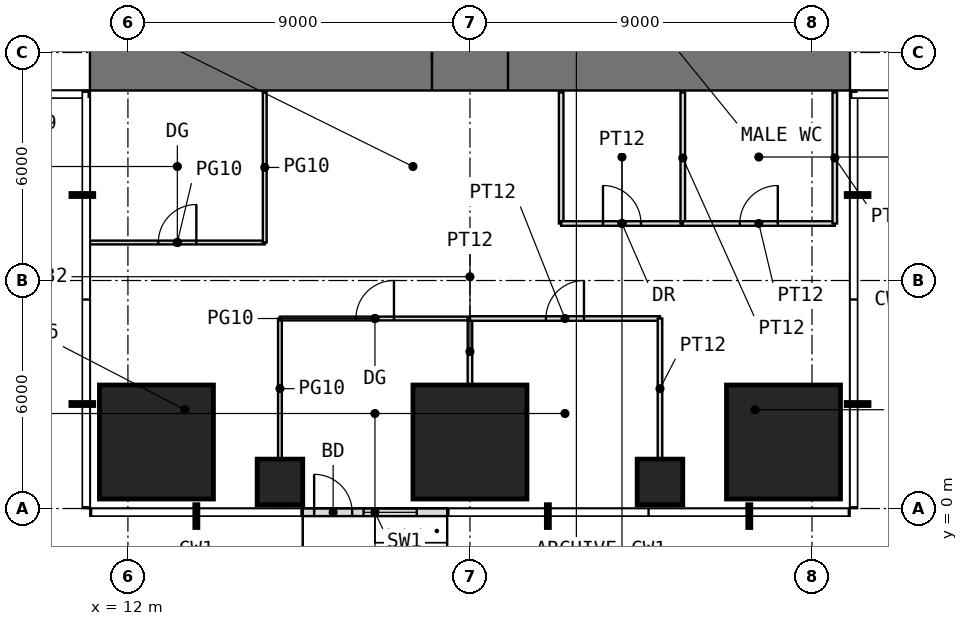
"""IFC4 building model, lengths in metres.
Left out: names, types, materials, properties, quantities, classifications, styles, units other than length and angle.
Written with IfcOpenShell. Run it as: python <this file> out.ifc"""

import sys

from ifc_helpers import new_model, si_unit, direction, frame, frame_2d, origin, origin_2d, place, context, subcontext, project, spatial, rectangle, extrude, element, fill, save


model = new_model("IFC4")
c1 = context("Model", 3, precision=1e-05, world=origin(), true_north=direction((0.0, 1.0)))
c2 = subcontext(c1, "Body", "Model", "MODEL_VIEW")
j1 = project(units=[si_unit("LENGTHUNIT", "METRE"), si_unit("PLANEANGLEUNIT", "RADIAN")], contexts=[c1])
p1 = place(None, origin())
s1 = spatial("IfcSite", under=j1, at=p1, CompositionType="ELEMENT")
p2 = place(p1, origin())
s2 = spatial("IfcBuilding", under=s1, at=p2, CompositionType="ELEMENT")
p3 = place(p2, frame((0.0, 0.0, 116.5)))
s3 = spatial("IfcBuildingStorey", under=s2, at=p3, CompositionType="ELEMENT", Elevation=116.5)
p4 = place(p3, frame((12.75, 1.75, 0.0), z_axis=(0.0, 0.0, 1.0), x_axis=(1.0, 0.0, 0.0)))
e1 = element("IfcColumn", 1, at=p4, inside=s3, PredefinedType="COLUMN", context=c2, shape_type="SweptSolid", body=[
    extrude(rectangle(XDim=3.0, YDim=3.0, at=origin_2d()), origin(), (0.0, 0.0, 1.0), 4.0),
])
p5 = place(p3, frame((16.0, 0.7, 0.0), z_axis=(0.0, 0.0, 1.0), x_axis=(1.0, 0.0, 0.0)))
e2 = element("IfcColumn", 2, at=p5, inside=s3, PredefinedType="COLUMN", context=c2, shape_type="SweptSolid", body=[
    extrude(rectangle(XDim=1.2, YDim=1.2, at=origin_2d()), origin(), (0.0, 0.0, 1.0), 4.0),
])
p6 = place(p3, frame((21.0, 1.75, 0.0), z_axis=(0.0, 0.0, 1.0), x_axis=(1.0, 0.0, 0.0)))
e3 = element("IfcColumn", 3, at=p6, inside=s3, PredefinedType="COLUMN", context=c2, shape_type="SweptSolid", body=[
    extrude(rectangle(XDim=3.0, YDim=3.0, at=origin_2d()), origin(), (0.0, 0.0, 1.0), 4.0),
])
p7 = place(p3, frame((26.0, 0.7, 0.0), z_axis=(0.0, 0.0, 1.0), x_axis=(1.0, 0.0, 0.0)))
e4 = element("IfcColumn", 4, at=p7, inside=s3, PredefinedType="COLUMN", context=c2, shape_type="SweptSolid", body=[
    extrude(rectangle(XDim=1.2, YDim=1.2, at=origin_2d()), origin(), (0.0, 0.0, 1.0), 4.0),
])
p8 = place(p3, frame((29.25, 1.75, 0.0), z_axis=(0.0, 0.0, 1.0), x_axis=(1.0, 0.0, 0.0)))
e5 = element("IfcColumn", 5, at=p8, inside=s3, PredefinedType="COLUMN", context=c2, shape_type="SweptSolid", body=[
    extrude(rectangle(XDim=3.0, YDim=3.0, at=origin_2d()), origin(), (0.0, 0.0, 1.0), 4.0),
])
p9 = place(p3, frame((16.6, -0.1, 0.0), z_axis=(0.0, 0.0, 1.0), x_axis=(1.0, 0.0, 0.0)))
e6 = element("IfcWall", 6, at=p9, inside=s3, PredefinedType="USERDEFINED", context=c2, shape_type="SweptSolid", body=[
    extrude(rectangle(XDim=3.8, YDim=0.2, at=frame_2d((1.9, 0.0))), origin(), (0.0, 0.0, 1.0), 3.75),
])
p10 = place(p9, frame((0.3, 0.0, 0.0)))
e7 = element("IfcOpeningElement", 7, at=p10, cuts=e6, PredefinedType="OPENING", context=c2, shape_type="SweptSolid", body=[
    extrude(rectangle(XDim=1.0, YDim=2.4, at=frame_2d((0.5, 1.2))), frame((0.0, 0.11, 0.0), z_axis=(0.0, -1.0, 0.0), x_axis=(1.0, 0.0, 0.0)), (0.0, 0.0, 1.0), 0.22),
])
p11 = place(p9, frame((1.6, 0.0, 0.3)))
e8 = element("IfcOpeningElement", 8, at=p11, cuts=e6, PredefinedType="OPENING", context=c2, shape_type="SweptSolid", body=[
    extrude(rectangle(XDim=1.4, YDim=2.7, at=frame_2d((0.7, 1.35))), frame((0.0, 0.11, 0.0), z_axis=(0.0, -1.0, 0.0), x_axis=(1.0, 0.0, 0.0)), (0.0, 0.0, 1.0), 0.22),
])
p12 = place(p3, frame((11.0, 11.8, -0.05), z_axis=(0.0, 0.0, 1.0), x_axis=(1.0, 0.0, 0.0)))
e9 = element("IfcWall", 9, at=p12, inside=s3, PredefinedType="SHEAR", context=c2, shape_type="SweptSolid", body=[
    extrude(rectangle(XDim=20.0, YDim=1.6, at=frame_2d((10.0, 0.0))), origin(), (0.0, 0.0, 1.0), 4.0),
])
p13 = place(p12, frame((9.0, 0.0, 0.05)))
e10 = element("IfcOpeningElement", 10, at=p13, cuts=e9, PredefinedType="OPENING", context=c2, shape_type="SweptSolid", body=[
    extrude(rectangle(XDim=2.0, YDim=2.2, at=frame_2d((1.0, 1.1))), frame((0.0, 0.81, 0.0), z_axis=(0.0, -1.0, 0.0), x_axis=(1.0, 0.0, 0.0)), (0.0, 0.0, 1.0), 1.62),
])
p14 = place(p3, frame((11.0, 7.0, 0.0), z_axis=(0.0, 0.0, 1.0), x_axis=(1.0, 0.0, 0.0)))
e11 = element("IfcWall", 11, at=p14, inside=s3, PredefinedType="PARTITIONING", context=c2, shape_type="SweptSolid", body=[
    extrude(rectangle(XDim=4.6, YDim=0.1, at=frame_2d((2.3, 0.0))), origin(), (0.0, 0.0, 1.0), 3.75),
])
p15 = place(p14, frame((1.8, 0.0, 0.0)))
e12 = element("IfcOpeningElement", 12, at=p15, cuts=e11, PredefinedType="OPENING", context=c2, shape_type="SweptSolid", body=[
    extrude(rectangle(XDim=1.0, YDim=2.4, at=frame_2d((0.5, 1.2))), frame((0.0, 0.06, 0.0), z_axis=(0.0, -1.0, 0.0), x_axis=(1.0, 0.0, 0.0)), (0.0, 0.0, 1.0), 0.12),
])
p16 = place(p3, frame((15.6, 7.0, 0.0), z_axis=(0.0, 0.0, 1.0), x_axis=(0.0, 1.0, 0.0)))
e13 = element("IfcWall", 13, at=p16, inside=s3, PredefinedType="PARTITIONING", context=c2, shape_type="SweptSolid", body=[
    extrude(rectangle(XDim=3.95, YDim=0.1, at=frame_2d((1.975, 0.0))), origin(), (0.0, 0.0, 1.0), 3.75),
])
p17 = place(p3, frame((16.0, 1.31, 0.0), z_axis=(0.0, 0.0, 1.0), x_axis=(0.0, 1.0, 0.0)))
e14 = element("IfcWall", 14, at=p17, inside=s3, PredefinedType="PARTITIONING", context=c2, shape_type="SweptSolid", body=[
    extrude(rectangle(XDim=3.69, YDim=0.1, at=frame_2d((1.845, 0.0))), origin(), (0.0, 0.0, 1.0), 3.75),
])
p18 = place(p3, frame((16.0, 5.0, 0.0), z_axis=(0.0, 0.0, 1.0), x_axis=(1.0, 0.0, 0.0)))
e15 = element("IfcWall", 15, at=p18, inside=s3, PredefinedType="PARTITIONING", context=c2, shape_type="SweptSolid", body=[
    extrude(rectangle(XDim=5.0, YDim=0.1, at=frame_2d((2.5, 0.0))), origin(), (0.0, 0.0, 1.0), 3.75),
])
p19 = place(p18, frame((2.0, 0.0, 0.0)))
e16 = element("IfcOpeningElement", 16, at=p19, cuts=e15, PredefinedType="OPENING", context=c2, shape_type="SweptSolid", body=[
    extrude(rectangle(XDim=1.0, YDim=2.4, at=frame_2d((0.5, 1.2))), frame((0.0, 0.06, 0.0), z_axis=(0.0, -1.0, 0.0), x_axis=(1.0, 0.0, 0.0)), (0.0, 0.0, 1.0), 0.12),
])
p20 = place(p3, frame((21.0, 3.26, 0.0), z_axis=(0.0, 0.0, 1.0), x_axis=(0.0, 1.0, 0.0)))
e17 = element("IfcWall", 17, at=p20, inside=s3, PredefinedType="PARTITIONING", context=c2, shape_type="SweptSolid", body=[
    extrude(rectangle(XDim=1.74, YDim=0.12, at=frame_2d((0.87, 0.0))), origin(), (0.0, 0.0, 1.0), 3.75),
])
p21 = place(p3, frame((21.0, 5.0, 0.0), z_axis=(0.0, 0.0, 1.0), x_axis=(1.0, 0.0, 0.0)))
e18 = element("IfcWall", 18, at=p21, inside=s3, PredefinedType="PARTITIONING", context=c2, shape_type="SweptSolid", body=[
    extrude(rectangle(XDim=5.0, YDim=0.12, at=frame_2d((2.5, 0.0))), origin(), (0.0, 0.0, 1.0), 3.75),
])
p22 = place(p21, frame((2.0, 0.0, 0.0)))
e19 = element("IfcOpeningElement", 19, at=p22, cuts=e18, PredefinedType="OPENING", context=c2, shape_type="SweptSolid", body=[
    extrude(rectangle(XDim=1.0, YDim=2.2, at=frame_2d((0.5, 1.1))), frame((0.0, 0.07, 0.0), z_axis=(0.0, -1.0, 0.0), x_axis=(1.0, 0.0, 0.0)), (0.0, 0.0, 1.0), 0.14),
])
p23 = place(p3, frame((23.4, 7.5, 0.0), z_axis=(0.0, 0.0, 1.0), x_axis=(0.0, 1.0, 0.0)))
e20 = element("IfcWall", 20, at=p23, inside=s3, PredefinedType="PARTITIONING", context=c2, shape_type="SweptSolid", body=[
    extrude(rectangle(XDim=3.45, YDim=0.12, at=frame_2d((1.725, 0.0))), origin(), (0.0, 0.0, 1.0), 3.75),
])
p24 = place(p3, frame((23.4, 7.5, 0.0), z_axis=(0.0, 0.0, 1.0), x_axis=(1.0, 0.0, 0.0)))
e21 = element("IfcWall", 21, at=p24, inside=s3, PredefinedType="PARTITIONING", context=c2, shape_type="SweptSolid", body=[
    extrude(rectangle(XDim=3.2, YDim=0.12, at=frame_2d((1.6, 0.0))), origin(), (0.0, 0.0, 1.0), 3.75),
])
p25 = place(p24, frame((1.1, 0.0, 0.0)))
e22 = element("IfcOpeningElement", 22, at=p25, cuts=e21, PredefinedType="OPENING", context=c2, shape_type="SweptSolid", body=[
    extrude(rectangle(XDim=1.0, YDim=2.2, at=frame_2d((0.5, 1.1))), frame((0.0, 0.07, 0.0), z_axis=(0.0, -1.0, 0.0), x_axis=(1.0, 0.0, 0.0)), (0.0, 0.0, 1.0), 0.14),
])
p26 = place(p3, frame((26.0, 1.31, 0.0), z_axis=(0.0, 0.0, 1.0), x_axis=(0.0, 1.0, 0.0)))
e23 = element("IfcWall", 23, at=p26, inside=s3, PredefinedType="PARTITIONING", context=c2, shape_type="SweptSolid", body=[
    extrude(rectangle(XDim=3.69, YDim=0.12, at=frame_2d((1.845, 0.0))), origin(), (0.0, 0.0, 1.0), 3.75),
])
p27 = place(p3, frame((26.6, 7.5, 0.0), z_axis=(0.0, 0.0, 1.0), x_axis=(0.0, 1.0, 0.0)))
e24 = element("IfcWall", 24, at=p27, inside=s3, PredefinedType="PARTITIONING", context=c2, shape_type="SweptSolid", body=[
    extrude(rectangle(XDim=3.45, YDim=0.12, at=frame_2d((1.725, 0.0))), origin(), (0.0, 0.0, 1.0), 3.75),
])
p28 = place(p3, frame((26.6, 7.5, 0.0), z_axis=(0.0, 0.0, 1.0), x_axis=(1.0, 0.0, 0.0)))
e25 = element("IfcWall", 25, at=p28, inside=s3, PredefinedType="PARTITIONING", context=c2, shape_type="SweptSolid", body=[
    extrude(rectangle(XDim=4.0, YDim=0.12, at=frame_2d((2.0, 0.0))), origin(), (0.0, 0.0, 1.0), 3.75),
])
p29 = place(p28, frame((1.5, 0.0, 0.0)))
e26 = element("IfcOpeningElement", 26, at=p29, cuts=e25, PredefinedType="OPENING", context=c2, shape_type="SweptSolid", body=[
    extrude(rectangle(XDim=1.0, YDim=2.2, at=frame_2d((0.5, 1.1))), frame((0.0, 0.07, 0.0), z_axis=(0.0, -1.0, 0.0), x_axis=(1.0, 0.0, 0.0)), (0.0, 0.0, 1.0), 0.14),
])
p30 = place(p3, frame((30.6, 7.5, 0.0), z_axis=(0.0, 0.0, 1.0), x_axis=(0.0, 1.0, 0.0)))
e27 = element("IfcWall", 27, at=p30, inside=s3, PredefinedType="PARTITIONING", context=c2, shape_type="SweptSolid", body=[
    extrude(rectangle(XDim=3.45, YDim=0.12, at=frame_2d((1.725, 0.0))), origin(), (0.0, 0.0, 1.0), 3.75),
])
p31 = place(p10, origin())
e28 = element("IfcDoor", 28, at=p31, inside=s3, OperationType="SINGLE_SWING_LEFT", PredefinedType="DOOR", context=c2, shape_type="SweptSolid", body=[
    extrude(rectangle(XDim=1.0, YDim=2.4, at=frame_2d((0.5, 1.2))), frame((0.0, 0.025, 0.0), z_axis=(0.0, -1.0, 0.0), x_axis=(1.0, 0.0, 0.0)), (0.0, 0.0, 1.0), 0.05),
])
fill(e7, e28)
p32 = place(p11, origin())
e29 = element("IfcWindow", 29, at=p32, inside=s3, PartitioningType="SINGLE_PANEL", PredefinedType="WINDOW", context=c2, shape_type="SweptSolid", body=[
    extrude(rectangle(XDim=1.4, YDim=2.7, at=frame_2d((0.7, 1.35))), frame((0.0, 0.03, 0.0), z_axis=(0.0, -1.0, 0.0), x_axis=(1.0, 0.0, 0.0)), (0.0, 0.0, 1.0), 0.06),
])
fill(e8, e29)
p33 = place(p13, origin())
e30 = element("IfcDoor", 30, at=p33, inside=s3, OperationType="DOUBLE_DOOR_SINGLE_SWING", PredefinedType="DOOR", context=c2, shape_type="SweptSolid", body=[
    extrude(rectangle(XDim=2.0, YDim=2.2, at=frame_2d((1.0, 1.1))), frame((0.0, 0.025, 0.0), z_axis=(0.0, -1.0, 0.0), x_axis=(1.0, 0.0, 0.0)), (0.0, 0.0, 1.0), 0.05),
])
fill(e10, e30)
p34 = place(p15, origin())
e31 = element("IfcDoor", 31, at=p34, inside=s3, OperationType="SINGLE_SWING_RIGHT", PredefinedType="DOOR", context=c2, shape_type="SweptSolid", body=[
    extrude(rectangle(XDim=1.0, YDim=2.4, at=frame_2d((0.5, 1.2))), frame((0.0, 0.025, 0.0), z_axis=(0.0, -1.0, 0.0), x_axis=(1.0, 0.0, 0.0)), (0.0, 0.0, 1.0), 0.05),
])
fill(e12, e31)
p35 = place(p25, origin())
e32 = element("IfcDoor", 32, at=p35, inside=s3, OperationType="SINGLE_SWING_LEFT", PredefinedType="DOOR", context=c2, shape_type="SweptSolid", body=[
    extrude(rectangle(XDim=1.0, YDim=2.2, at=frame_2d((0.5, 1.1))), frame((0.0, 0.025, 0.0), z_axis=(0.0, -1.0, 0.0), x_axis=(1.0, 0.0, 0.0)), (0.0, 0.0, 1.0), 0.05),
])
fill(e22, e32)
p36 = place(p29, origin())
e33 = element("IfcDoor", 33, at=p36, inside=s3, OperationType="SINGLE_SWING_RIGHT", PredefinedType="DOOR", context=c2, shape_type="SweptSolid", body=[
    extrude(rectangle(XDim=1.0, YDim=2.2, at=frame_2d((0.5, 1.1))), frame((0.0, 0.025, 0.0), z_axis=(0.0, -1.0, 0.0), x_axis=(1.0, 0.0, 0.0)), (0.0, 0.0, 1.0), 0.05),
])
fill(e26, e33)
p37 = place(p19, origin())
e34 = element("IfcDoor", 34, at=p37, inside=s3, OperationType="SINGLE_SWING_RIGHT", PredefinedType="DOOR", context=c2, shape_type="SweptSolid", body=[
    extrude(rectangle(XDim=1.0, YDim=2.4, at=frame_2d((0.5, 1.2))), frame((0.0, 0.025, 0.0), z_axis=(0.0, -1.0, 0.0), x_axis=(1.0, 0.0, 0.0)), (0.0, 0.0, 1.0), 0.05),
])
fill(e16, e34)
p38 = place(p22, origin())
e35 = element("IfcDoor", 35, at=p38, inside=s3, OperationType="SINGLE_SWING_RIGHT", PredefinedType="DOOR", context=c2, shape_type="SweptSolid", body=[
    extrude(rectangle(XDim=1.0, YDim=2.2, at=frame_2d((0.5, 1.1))), frame((0.0, 0.025, 0.0), z_axis=(0.0, -1.0, 0.0), x_axis=(1.0, 0.0, 0.0)), (0.0, 0.0, 1.0), 0.05),
])
fill(e19, e35)
save(model, sys.argv[1])
